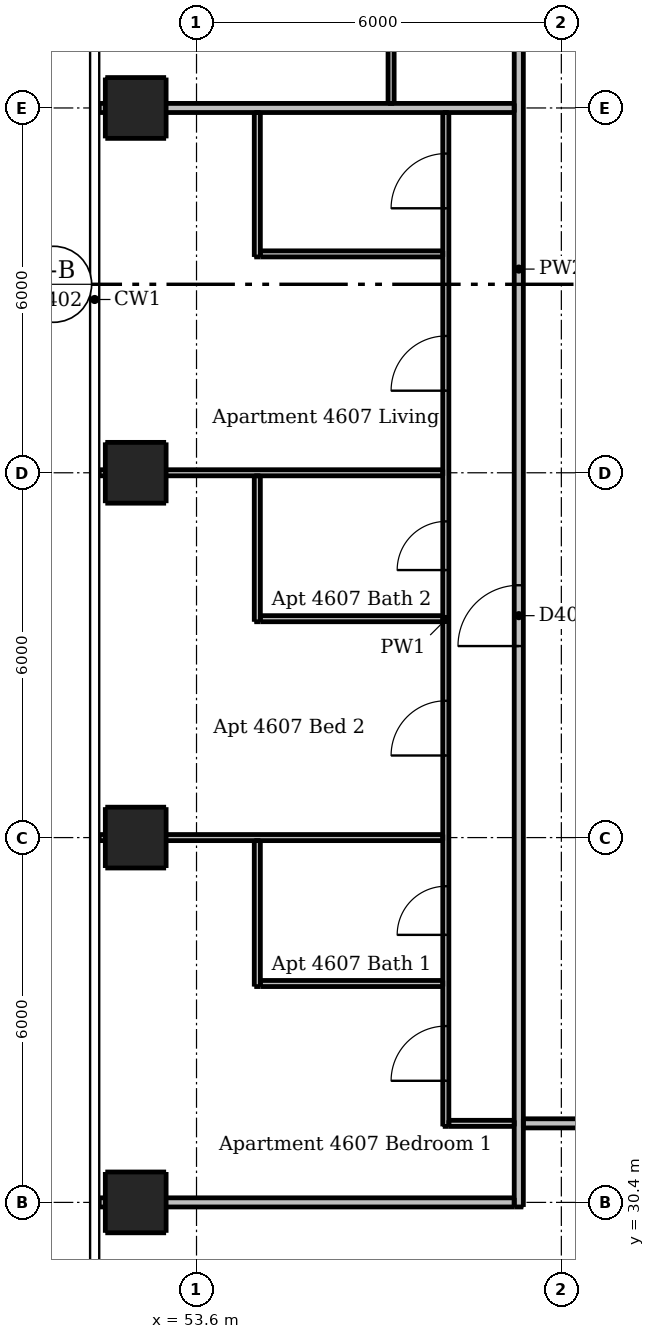
"""IFC4 building model, lengths in metres.
Left out: names, types, materials, properties, quantities, classifications, styles, units other than length and angle.
Written with IfcOpenShell. Run it as: python <this file> out.ifc"""

import sys

from ifc_helpers import new_model, si_unit, direction, frame, frame_2d, origin, origin_2d, place, context, subcontext, project, spatial, rectangle, extrude, element, fill, save


model = new_model("IFC4")
c1 = context("Model", 3, precision=1e-05, world=origin(), true_north=direction((0.0, 1.0)))
c2 = subcontext(c1, "Body", "Model", "MODEL_VIEW")
j1 = project(units=[si_unit("LENGTHUNIT", "METRE"), si_unit("PLANEANGLEUNIT", "RADIAN")], contexts=[c1])
p1 = place(None, origin())
s1 = spatial("IfcSite", under=j1, at=p1, CompositionType="ELEMENT")
p2 = place(p1, origin())
s2 = spatial("IfcBuilding", under=s1, at=p2, CompositionType="ELEMENT")
p3 = place(p2, frame((0.0, 0.0, 171.4)))
s3 = spatial("IfcBuildingStorey", under=s2, at=p3, CompositionType="ELEMENT", Elevation=171.4)
for number, where, z_axis, x_axis in (
    (1, (52.6, 30.4, 0.0), (0.0, 0.0, 1.0), (1.0, 0.0, 0.0)),
    (2, (52.6, 36.4, 0.0), (0.0, 0.0, 1.0), (1.0, 0.0, 0.0)),
    (3, (52.6, 42.4, 0.0), (0.0, 0.0, 1.0), (1.0, 0.0, 0.0)),
    (4, (52.6, 48.4, 0.0), (0.0, 0.0, 1.0), (1.0, 0.0, 0.0)),
):
    element("IfcColumn", number, at=place(p3, frame(where, z_axis=z_axis, x_axis=x_axis)), inside=s3, PredefinedType="COLUMN", context=c2, shape_type="SweptSolid", body=[
        extrude(rectangle(XDim=1.0, YDim=1.0, at=origin_2d()), origin(), (0.0, 0.0, 1.0), 3.05),
    ])
for number, where, z_axis, x_axis in (
    (5, (54.6, 33.95, 0.0), (0.0, 0.0, 1.0), (0.0, 1.0, 0.0)),
    (6, (54.6, 39.95, 0.0), (0.0, 0.0, 1.0), (0.0, 1.0, 0.0)),
):
    element("IfcWall", number, at=place(p3, frame(where, z_axis=z_axis, x_axis=x_axis)), inside=s3, PredefinedType="PARTITIONING", context=c2, shape_type="SweptSolid", body=[
        extrude(rectangle(XDim=2.4, YDim=0.1, at=frame_2d((1.2, 0.0))), origin(), (0.0, 0.0, 1.0), 3.05),
    ])
p4 = place(p3, frame((54.6, 45.95, 0.0), z_axis=(0.0, 0.0, 1.0), x_axis=(0.0, 1.0, 0.0)))
e7 = element("IfcWall", 7, at=p4, inside=s3, PredefinedType="PARTITIONING", context=c2, shape_type="SweptSolid", body=[
    extrude(rectangle(XDim=2.375, YDim=0.1, at=frame_2d((1.188, 0.0))), origin(), (0.0, 0.0, 1.0), 3.05),
])
p5 = place(p3, frame((56.8, 54.35, 0.0), z_axis=(0.0, 0.0, 1.0), x_axis=(0.0, -1.0, 0.0)))
e8 = element("IfcWall", 8, at=p5, inside=s3, PredefinedType="PARTITIONING", context=c2, shape_type="SweptSolid", body=[
    extrude(rectangle(XDim=5.875, YDim=0.1, at=frame_2d((2.938, 0.0))), origin(), (0.0, 0.0, 1.0), 3.05),
])
p6 = place(p5, frame((3.75, 0.0, 0.0)))
e9 = element("IfcOpeningElement", 9, at=p6, cuts=e8, PredefinedType="OPENING", context=c2, shape_type="SweptSolid", body=[
    extrude(rectangle(XDim=0.8, YDim=2.1, at=frame_2d((0.4, 1.05))), frame((0.0, 0.06, 0.0), z_axis=(0.0, -1.0, 0.0), x_axis=(1.0, 0.0, 0.0)), (0.0, 0.0, 1.0), 0.12),
])
p7 = place(p3, frame((57.7, 31.65, 0.0), z_axis=(0.0, 0.0, 1.0), x_axis=(0.0, 1.0, 0.0)))
e10 = element("IfcWall", 10, at=p7, inside=s3, PredefinedType="PARTITIONING", context=c2, shape_type="SweptSolid", body=[
    extrude(rectangle(XDim=16.675, YDim=0.1, at=frame_2d((8.337, 0.0))), origin(), (0.0, 0.0, 1.0), 3.05),
])
p8 = place(p7, frame((12.1, 0.0, 0.0)))
e11 = element("IfcOpeningElement", 11, at=p8, cuts=e10, PredefinedType="OPENING", context=c2, shape_type="SweptSolid", body=[
    extrude(rectangle(XDim=0.9, YDim=2.1, at=frame_2d((0.45, 1.05))), frame((0.0, 0.06, 0.0), z_axis=(0.0, -1.0, 0.0), x_axis=(1.0, 0.0, 0.0)), (0.0, 0.0, 1.0), 0.12),
])
p9 = place(p7, frame((15.1, 0.0, 0.0)))
e12 = element("IfcOpeningElement", 12, at=p9, cuts=e10, PredefinedType="OPENING", context=c2, shape_type="SweptSolid", body=[
    extrude(rectangle(XDim=0.9, YDim=2.1, at=frame_2d((0.45, 1.05))), frame((0.0, 0.06, 0.0), z_axis=(0.0, -1.0, 0.0), x_axis=(1.0, 0.0, 0.0)), (0.0, 0.0, 1.0), 0.12),
])
p10 = place(p7, frame((0.75, 0.0, 0.0)))
e13 = element("IfcOpeningElement", 13, at=p10, cuts=e10, PredefinedType="OPENING", context=c2, shape_type="SweptSolid", body=[
    extrude(rectangle(XDim=0.9, YDim=2.1, at=frame_2d((0.45, 1.05))), frame((0.0, 0.06, 0.0), z_axis=(0.0, -1.0, 0.0), x_axis=(1.0, 0.0, 0.0)), (0.0, 0.0, 1.0), 0.12),
])
p11 = place(p7, frame((6.1, 0.0, 0.0)))
e14 = element("IfcOpeningElement", 14, at=p11, cuts=e10, PredefinedType="OPENING", context=c2, shape_type="SweptSolid", body=[
    extrude(rectangle(XDim=0.9, YDim=2.1, at=frame_2d((0.45, 1.05))), frame((0.0, 0.06, 0.0), z_axis=(0.0, -1.0, 0.0), x_axis=(1.0, 0.0, 0.0)), (0.0, 0.0, 1.0), 0.12),
])
p12 = place(p7, frame((3.15, 0.0, 0.0)))
e15 = element("IfcOpeningElement", 15, at=p12, cuts=e10, PredefinedType="OPENING", context=c2, shape_type="SweptSolid", body=[
    extrude(rectangle(XDim=0.8, YDim=2.1, at=frame_2d((0.4, 1.05))), frame((0.0, 0.06, 0.0), z_axis=(0.0, -1.0, 0.0), x_axis=(1.0, 0.0, 0.0)), (0.0, 0.0, 1.0), 0.12),
])
p13 = place(p7, frame((9.15, 0.0, 0.0)))
e16 = element("IfcOpeningElement", 16, at=p13, cuts=e10, PredefinedType="OPENING", context=c2, shape_type="SweptSolid", body=[
    extrude(rectangle(XDim=0.8, YDim=2.1, at=frame_2d((0.4, 1.05))), frame((0.0, 0.06, 0.0), z_axis=(0.0, -1.0, 0.0), x_axis=(1.0, 0.0, 0.0)), (0.0, 0.0, 1.0), 0.12),
])
p14 = place(p3, frame((54.65, 46.0, 0.0), z_axis=(0.0, 0.0, 1.0), x_axis=(1.0, 0.0, 0.0)))
e17 = element("IfcWall", 17, at=p14, inside=s3, PredefinedType="PARTITIONING", context=c2, shape_type="SweptSolid", body=[
    extrude(rectangle(XDim=3.0, YDim=0.1, at=frame_2d((1.5, 0.0))), origin(), (0.0, 0.0, 1.0), 3.05),
])
p15 = place(p3, frame((52.0, 42.4, 0.0), z_axis=(0.0, 0.0, 1.0), x_axis=(1.0, 0.0, 0.0)))
e18 = element("IfcWall", 18, at=p15, inside=s3, PredefinedType="PARTITIONING", context=c2, shape_type="SweptSolid", body=[
    extrude(rectangle(XDim=5.65, YDim=0.1, at=frame_2d((2.825, 0.0))), origin(), (0.0, 0.0, 1.0), 2.516),
])
p16 = place(p3, frame((54.65, 40.0, 0.0), z_axis=(0.0, 0.0, 1.0), x_axis=(1.0, 0.0, 0.0)))
e19 = element("IfcWall", 19, at=p16, inside=s3, PredefinedType="PARTITIONING", context=c2, shape_type="SweptSolid", body=[
    extrude(rectangle(XDim=3.0, YDim=0.1, at=frame_2d((1.5, 0.0))), origin(), (0.0, 0.0, 1.0), 3.05),
])
p17 = place(p3, frame((52.0, 36.4, 0.0), z_axis=(0.0, 0.0, 1.0), x_axis=(1.0, 0.0, 0.0)))
e20 = element("IfcWall", 20, at=p17, inside=s3, PredefinedType="PARTITIONING", context=c2, shape_type="SweptSolid", body=[
    extrude(rectangle(XDim=5.65, YDim=0.1, at=frame_2d((2.825, 0.0))), origin(), (0.0, 0.0, 1.0), 2.516),
])
p18 = place(p3, frame((54.65, 34.0, 0.0), z_axis=(0.0, 0.0, 1.0), x_axis=(1.0, 0.0, 0.0)))
e21 = element("IfcWall", 21, at=p18, inside=s3, PredefinedType="PARTITIONING", context=c2, shape_type="SweptSolid", body=[
    extrude(rectangle(XDim=3.0, YDim=0.1, at=frame_2d((1.5, 0.0))), origin(), (0.0, 0.0, 1.0), 3.05),
])
p19 = place(p3, frame((57.75, 31.7, 0.0), z_axis=(0.0, 0.0, 1.0), x_axis=(1.0, 0.0, 0.0)))
e22 = element("IfcWall", 22, at=p19, inside=s3, PredefinedType="PARTITIONING", context=c2, shape_type="SweptSolid", body=[
    extrude(rectangle(XDim=1.075, YDim=0.1, at=frame_2d((0.538, 0.0))), origin(), (0.0, 0.0, 1.0), 3.05),
])
p20 = place(p3, frame((58.9, 30.325, 0.0), z_axis=(0.0, 0.0, 1.0), x_axis=(0.0, 1.0, 0.0)))
e23 = element("IfcWall", 23, at=p20, inside=s3, PredefinedType="PARTITIONING", context=c2, shape_type="SweptSolid", body=[
    extrude(rectangle(XDim=30.85, YDim=0.15, at=frame_2d((15.425, 0.0))), origin(), (0.0, 0.0, 1.0), 3.05),
])
p21 = place(p20, frame((9.225, 0.0, 0.0)))
e24 = element("IfcOpeningElement", 24, at=p21, cuts=e23, PredefinedType="OPENING", context=c2, shape_type="SweptSolid", body=[
    extrude(rectangle(XDim=1.0, YDim=2.1, at=frame_2d((0.5, 1.05))), frame((0.0, 0.085, 0.0), z_axis=(0.0, -1.0, 0.0), x_axis=(1.0, 0.0, 0.0)), (0.0, 0.0, 1.0), 0.17),
])
p22 = place(p20, frame((26.925, 0.0, 0.0)))
e25 = element("IfcOpeningElement", 25, at=p22, cuts=e23, PredefinedType="OPENING", context=c2, shape_type="SweptSolid", body=[
    extrude(rectangle(XDim=1.0, YDim=2.1, at=frame_2d((0.5, 1.05))), frame((0.0, 0.085, 0.0), z_axis=(0.0, -1.0, 0.0), x_axis=(1.0, 0.0, 0.0)), (0.0, 0.0, 1.0), 0.17),
])
p23 = place(p3, frame((52.0, 48.4, 0.0), z_axis=(0.0, 0.0, 1.0), x_axis=(1.0, 0.0, 0.0)))
e26 = element("IfcWall", 26, at=p23, inside=s3, PredefinedType="PARTITIONING", context=c2, shape_type="SweptSolid", body=[
    extrude(rectangle(XDim=6.825, YDim=0.15, at=frame_2d((3.413, 0.0))), origin(), (0.0, 0.0, 1.0), 2.516),
])
p24 = place(p3, frame((89.525, 31.7, 0.0), z_axis=(0.0, 0.0, 1.0), x_axis=(-1.0, 0.0, 0.0)))
e27 = element("IfcWall", 27, at=p24, inside=s3, PredefinedType="PARTITIONING", context=c2, shape_type="SweptSolid", body=[
    extrude(rectangle(XDim=30.55, YDim=0.15, at=frame_2d((15.275, 0.0))), origin(), (0.0, 0.0, 1.0), 3.05),
])
p25 = place(p24, frame((26.775, 0.0, 0.0)))
e28 = element("IfcOpeningElement", 28, at=p25, cuts=e27, PredefinedType="OPENING", context=c2, shape_type="SweptSolid", body=[
    extrude(rectangle(XDim=1.0, YDim=2.1, at=frame_2d((0.5, 1.05))), frame((0.0, 0.085, 0.0), z_axis=(0.0, -1.0, 0.0), x_axis=(1.0, 0.0, 0.0)), (0.0, 0.0, 1.0), 0.17),
])
p26 = place(p24, frame((8.425, 0.0, 0.0)))
e29 = element("IfcOpeningElement", 29, at=p26, cuts=e27, PredefinedType="OPENING", context=c2, shape_type="SweptSolid", body=[
    extrude(rectangle(XDim=1.0, YDim=2.1, at=frame_2d((0.5, 1.05))), frame((0.0, 0.085, 0.0), z_axis=(0.0, -1.0, 0.0), x_axis=(1.0, 0.0, 0.0)), (0.0, 0.0, 1.0), 0.17),
])
p27 = place(p3, frame((52.0, 30.4, 0.0), z_axis=(0.0, 0.0, 1.0), x_axis=(1.0, 0.0, 0.0)))
e30 = element("IfcWall", 30, at=p27, inside=s3, PredefinedType="PARTITIONING", context=c2, shape_type="SweptSolid", body=[
    extrude(rectangle(XDim=6.825, YDim=0.15, at=frame_2d((3.413, 0.0))), origin(), (0.0, 0.0, 1.0), 2.647),
])
p28 = place(p21, origin())
e31 = element("IfcDoor", 31, at=p28, inside=s3, OperationType="SINGLE_SWING_LEFT", PredefinedType="DOOR", context=c2, shape_type="SweptSolid", body=[
    extrude(rectangle(XDim=1.0, YDim=2.1, at=frame_2d((0.5, 1.05))), frame((0.0, 0.025, 0.0), z_axis=(0.0, -1.0, 0.0), x_axis=(1.0, 0.0, 0.0)), (0.0, 0.0, 1.0), 0.05),
])
fill(e24, e31)
p29 = place(p8, origin())
e32 = element("IfcDoor", 32, at=p29, inside=s3, OperationType="SINGLE_SWING_LEFT", PredefinedType="DOOR", context=c2, shape_type="SweptSolid", body=[
    extrude(rectangle(XDim=0.9, YDim=2.1, at=frame_2d((0.45, 1.05))), frame((0.0, 0.025, 0.0), z_axis=(0.0, -1.0, 0.0), x_axis=(1.0, 0.0, 0.0)), (0.0, 0.0, 1.0), 0.05),
])
fill(e11, e32)
p30 = place(p9, origin())
e33 = element("IfcDoor", 33, at=p30, inside=s3, OperationType="SINGLE_SWING_LEFT", PredefinedType="DOOR", context=c2, shape_type="SweptSolid", body=[
    extrude(rectangle(XDim=0.9, YDim=2.1, at=frame_2d((0.45, 1.05))), frame((0.0, 0.025, 0.0), z_axis=(0.0, -1.0, 0.0), x_axis=(1.0, 0.0, 0.0)), (0.0, 0.0, 1.0), 0.05),
])
fill(e12, e33)
p31 = place(p10, origin())
e34 = element("IfcDoor", 34, at=p31, inside=s3, OperationType="SINGLE_SWING_LEFT", PredefinedType="DOOR", context=c2, shape_type="SweptSolid", body=[
    extrude(rectangle(XDim=0.9, YDim=2.1, at=frame_2d((0.45, 1.05))), frame((0.0, 0.025, 0.0), z_axis=(0.0, -1.0, 0.0), x_axis=(1.0, 0.0, 0.0)), (0.0, 0.0, 1.0), 0.05),
])
fill(e13, e34)
p32 = place(p11, origin())
e35 = element("IfcDoor", 35, at=p32, inside=s3, OperationType="SINGLE_SWING_LEFT", PredefinedType="DOOR", context=c2, shape_type="SweptSolid", body=[
    extrude(rectangle(XDim=0.9, YDim=2.1, at=frame_2d((0.45, 1.05))), frame((0.0, 0.025, 0.0), z_axis=(0.0, -1.0, 0.0), x_axis=(1.0, 0.0, 0.0)), (0.0, 0.0, 1.0), 0.05),
])
fill(e14, e35)
p33 = place(p12, origin())
e36 = element("IfcDoor", 36, at=p33, inside=s3, OperationType="SINGLE_SWING_LEFT", PredefinedType="DOOR", context=c2, shape_type="SweptSolid", body=[
    extrude(rectangle(XDim=0.8, YDim=2.1, at=frame_2d((0.4, 1.05))), frame((0.0, 0.025, 0.0), z_axis=(0.0, -1.0, 0.0), x_axis=(1.0, 0.0, 0.0)), (0.0, 0.0, 1.0), 0.05),
])
fill(e15, e36)
p34 = place(p13, origin())
e37 = element("IfcDoor", 37, at=p34, inside=s3, OperationType="SINGLE_SWING_LEFT", PredefinedType="DOOR", context=c2, shape_type="SweptSolid", body=[
    extrude(rectangle(XDim=0.8, YDim=2.1, at=frame_2d((0.4, 1.05))), frame((0.0, 0.025, 0.0), z_axis=(0.0, -1.0, 0.0), x_axis=(1.0, 0.0, 0.0)), (0.0, 0.0, 1.0), 0.05),
])
fill(e16, e37)
save(model, sys.argv[1])
